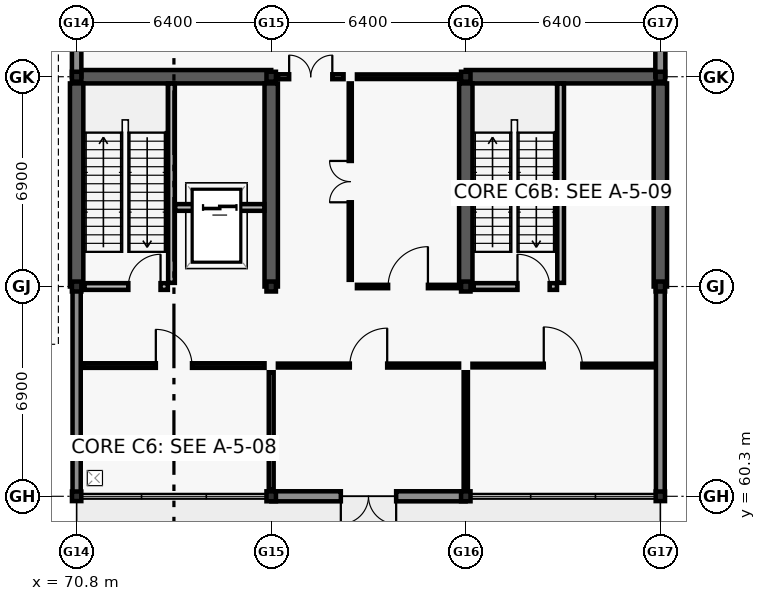
"""IFC4 building model, lengths in metres.
Left out: names, types, materials, properties, quantities, classifications, styles, units other than length and angle.
Written with IfcOpenShell. Run it as: python <this file> out.ifc"""

import sys

from ifc_helpers import new_model, si_unit, direction, frame, frame_2d, origin, origin_2d, place, context, subcontext, project, spatial, rectangle, i_section, extrude, element, fill, save


model = new_model("IFC4")
c1 = context("Model", 3, precision=1e-05, world=origin(), true_north=direction((0.0, 1.0)))
c2 = subcontext(c1, "Body", "Model", "MODEL_VIEW")
j1 = project(units=[si_unit("LENGTHUNIT", "METRE"), si_unit("PLANEANGLEUNIT", "RADIAN")], contexts=[c1])
p1 = place(None, origin())
s1 = spatial("IfcSite", under=j1, at=p1, CompositionType="ELEMENT")
p2 = place(p1, origin())
s2 = spatial("IfcBuilding", under=s1, at=p2, CompositionType="ELEMENT")
p3 = place(p2, origin())
s3 = spatial("IfcBuildingStorey", under=s2, at=p3, CompositionType="ELEMENT", Elevation=0.0)
p4 = place(p3, frame((70.8, 60.3, 0.0), z_axis=(0.0, 0.0, 1.0), x_axis=(1.0, 0.0, 0.0)))
e1 = element("IfcColumn", 1, at=p4, inside=s3, PredefinedType="COLUMN", context=c2, shape_type="SweptSolid", body=[
    extrude(i_section(OverallWidth=0.307, OverallDepth=0.315, WebThickness=0.012, FlangeThickness=0.019, FilletRadius=0.017, at=origin_2d()), origin(), (0.0, 0.0, 1.0), 5.4),
])
for number, where, z_axis, x_axis in (
    (2, (70.8, 67.2, 0.0), (0.0, 0.0, 1.0), (1.0, 0.0, 0.0)),
    (3, (70.8, 74.1, 0.0), (0.0, 0.0, 1.0), (1.0, 0.0, 0.0)),
    (4, (77.2, 60.3, 0.0), (0.0, 0.0, 1.0), (1.0, 0.0, 0.0)),
    (5, (77.2, 67.2, 0.0), (0.0, 0.0, 1.0), (1.0, 0.0, 0.0)),
    (6, (77.2, 74.1, 0.0), (0.0, 0.0, 1.0), (1.0, 0.0, 0.0)),
    (7, (83.6, 60.3, 0.0), (0.0, 0.0, 1.0), (1.0, 0.0, 0.0)),
    (8, (83.6, 67.2, 0.0), (0.0, 0.0, 1.0), (1.0, 0.0, 0.0)),
    (9, (83.6, 74.1, 0.0), (0.0, 0.0, 1.0), (1.0, 0.0, 0.0)),
):
    element("IfcColumn", number, at=place(p3, frame(where, z_axis=z_axis, x_axis=x_axis)), inside=s3, PredefinedType="COLUMN", context=c2, shape_type="SweptSolid", body=[
        extrude(i_section(OverallWidth=0.311, OverallDepth=0.327, WebThickness=0.016, FlangeThickness=0.025, FilletRadius=0.017, at=origin_2d()), origin(), (0.0, 0.0, 1.0), 5.4),
    ])
p5 = place(p3, frame((90.0, 60.3, 0.0), z_axis=(0.0, 0.0, 1.0), x_axis=(1.0, 0.0, 0.0)))
e10 = element("IfcColumn", 10, at=p5, inside=s3, PredefinedType="COLUMN", context=c2, shape_type="SweptSolid", body=[
    extrude(i_section(OverallWidth=0.307, OverallDepth=0.315, WebThickness=0.012, FlangeThickness=0.019, FilletRadius=0.017, at=origin_2d()), origin(), (0.0, 0.0, 1.0), 5.4),
])
for number, where, z_axis, x_axis in (
    (11, (90.0, 67.2, 0.0), (0.0, 0.0, 1.0), (1.0, 0.0, 0.0)),
    (12, (90.0, 74.1, 0.0), (0.0, 0.0, 1.0), (1.0, 0.0, 0.0)),
):
    element("IfcColumn", number, at=place(p3, frame(where, z_axis=z_axis, x_axis=x_axis)), inside=s3, PredefinedType="COLUMN", context=c2, shape_type="SweptSolid", body=[
        extrude(i_section(OverallWidth=0.311, OverallDepth=0.327, WebThickness=0.016, FlangeThickness=0.025, FilletRadius=0.017, at=origin_2d()), origin(), (0.0, 0.0, 1.0), 5.4),
    ])
p6 = place(p3, frame((70.8, 74.1, 0.0), z_axis=(0.0, 0.0, 1.0), x_axis=(1.0, 0.0, 0.0)))
e13 = element("IfcWall", 13, at=p6, inside=s3, PredefinedType="SHEAR", context=c2, shape_type="SweptSolid", body=[
    extrude(rectangle(XDim=6.4, YDim=0.44, at=frame_2d((3.2, 0.0))), origin(), (0.0, 0.0, 1.0), 5.16),
])
for number, where, z_axis, x_axis in (
    (14, (70.8, 67.2, 0.0), (0.0, 0.0, 1.0), (0.0, 1.0, 0.0)),
    (15, (77.2, 67.2, 0.0), (0.0, 0.0, 1.0), (0.0, 1.0, 0.0)),
):
    element("IfcWall", number, at=place(p3, frame(where, z_axis=z_axis, x_axis=x_axis)), inside=s3, PredefinedType="SHEAR", context=c2, shape_type="SweptSolid", body=[
        extrude(rectangle(XDim=6.68, YDim=0.44, at=frame_2d((3.34, 0.0))), origin(), (0.0, 0.0, 1.0), 5.16),
    ])
p7 = place(p3, frame((83.6, 74.1, 0.0), z_axis=(0.0, 0.0, 1.0), x_axis=(1.0, 0.0, 0.0)))
e16 = element("IfcWall", 16, at=p7, inside=s3, PredefinedType="SHEAR", context=c2, shape_type="SweptSolid", body=[
    extrude(rectangle(XDim=6.4, YDim=0.44, at=frame_2d((3.2, 0.0))), origin(), (0.0, 0.0, 1.0), 5.16),
])
for number, where, z_axis, x_axis in (
    (17, (83.6, 67.2, 0.0), (0.0, 0.0, 1.0), (0.0, 1.0, 0.0)),
    (18, (90.0, 67.2, 0.0), (0.0, 0.0, 1.0), (0.0, 1.0, 0.0)),
):
    element("IfcWall", number, at=place(p3, frame(where, z_axis=z_axis, x_axis=x_axis)), inside=s3, PredefinedType="SHEAR", context=c2, shape_type="SweptSolid", body=[
        extrude(rectangle(XDim=6.68, YDim=0.44, at=frame_2d((3.34, 0.0))), origin(), (0.0, 0.0, 1.0), 5.16),
    ])
p8 = place(p3, frame((83.595, 60.3, 0.0), z_axis=(0.0, 0.0, 1.0), x_axis=(-1.0, 0.0, 0.0)))
e19 = element("IfcWall", 19, at=p8, inside=s3, PredefinedType="SOLIDWALL", context=c2, shape_type="SweptSolid", body=[
    extrude(rectangle(XDim=6.39, YDim=0.33, at=frame_2d((3.195, 0.0))), origin(), (0.0, 0.0, 1.0), 4.52),
])
p9 = place(p8, frame((2.285, 0.0, 0.0)))
e20 = element("IfcOpeningElement", 20, at=p9, cuts=e19, PredefinedType="OPENING", context=c2, shape_type="SweptSolid", body=[
    extrude(rectangle(XDim=1.82, YDim=2.2, at=frame_2d((0.91, 1.1))), frame((0.0, 0.175, 0.0), z_axis=(0.0, -1.0, 0.0), x_axis=(1.0, 0.0, 0.0)), (0.0, 0.0, 1.0), 0.35),
])
p10 = place(p3, frame((70.8, 60.305, 0.0), z_axis=(0.0, 0.0, 1.0), x_axis=(0.0, 1.0, 0.0)))
e21 = element("IfcWall", 21, at=p10, inside=s3, PredefinedType="SOLIDWALL", context=c2, shape_type="SweptSolid", body=[
    extrude(rectangle(XDim=6.89, YDim=0.27, at=frame_2d((3.445, 0.0))), origin(), (0.0, 0.0, 1.0), 4.52),
])
p11 = place(p3, frame((90.0, 67.195, 0.0), z_axis=(0.0, 0.0, 1.0), x_axis=(0.0, -1.0, 0.0)))
e22 = element("IfcWall", 22, at=p11, inside=s3, PredefinedType="SOLIDWALL", context=c2, shape_type="SweptSolid", body=[
    extrude(rectangle(XDim=6.89, YDim=0.29, at=frame_2d((3.445, 0.0))), origin(), (0.0, 0.0, 1.0), 4.52),
])
p12 = place(p3, frame((70.8, 74.105, 0.0), z_axis=(0.0, 0.0, 1.0), x_axis=(0.0, 1.0, 0.0)))
e23 = element("IfcWall", 23, at=p12, inside=s3, PredefinedType="SOLIDWALL", context=c2, shape_type="SweptSolid", body=[
    extrude(rectangle(XDim=6.89, YDim=0.31, at=frame_2d((3.445, 0.0))), origin(), (0.0, 0.0, 1.0), 4.52),
])
p13 = place(p12, frame((2.62, 0.0, 0.8)))
e24 = element("IfcOpeningElement", 24, at=p13, cuts=e23, PredefinedType="OPENING", context=c2, shape_type="SweptSolid", body=[
    extrude(rectangle(XDim=1.65, YDim=2.05, at=frame_2d((0.825, 1.025))), frame((0.0, 0.165, 0.0), z_axis=(0.0, -1.0, 0.0), x_axis=(1.0, 0.0, 0.0)), (0.0, 0.0, 1.0), 0.33),
])
p14 = place(p3, frame((90.0, 80.995, 0.0), z_axis=(0.0, 0.0, 1.0), x_axis=(0.0, -1.0, 0.0)))
e25 = element("IfcWall", 25, at=p14, inside=s3, PredefinedType="SOLIDWALL", context=c2, shape_type="SweptSolid", body=[
    extrude(rectangle(XDim=6.89, YDim=0.33, at=frame_2d((3.445, 0.0))), origin(), (0.0, 0.0, 1.0), 4.52),
])
p15 = place(p14, frame((2.295, 0.0, 0.8)))
e26 = element("IfcOpeningElement", 26, at=p15, cuts=e25, PredefinedType="OPENING", context=c2, shape_type="SweptSolid", body=[
    extrude(rectangle(XDim=2.3, YDim=1.15, at=frame_2d((1.15, 0.575))), frame((0.0, 0.175, 0.0), z_axis=(0.0, -1.0, 0.0), x_axis=(1.0, 0.0, 0.0)), (0.0, 0.0, 1.0), 0.35),
])
p16 = place(p3, frame((73.92, 67.32, 0.0), z_axis=(0.0, 0.0, 1.0), x_axis=(0.0, 1.0, 0.0)))
e27 = element("IfcWall", 27, at=p16, inside=s3, PredefinedType="SOLIDWALL", context=c2, shape_type="SweptSolid", body=[
    extrude(rectangle(XDim=6.555, YDim=0.22, at=frame_2d((3.277, 0.0))), origin(), (0.0, 0.0, 1.0), 5.16),
])
p17 = place(p3, frame((71.06, 67.2, 0.0), z_axis=(0.0, 0.0, 1.0), x_axis=(1.0, 0.0, 0.0)))
e28 = element("IfcWall", 28, at=p17, inside=s3, PredefinedType="SOLIDWALL", context=c2, shape_type="SweptSolid", body=[
    extrude(rectangle(XDim=2.74, YDim=0.22, at=frame_2d((1.37, 0.0))), origin(), (0.0, 0.0, 1.0), 4.52),
])
p18 = place(p17, frame((1.44, 0.0, 0.0)))
e29 = element("IfcOpeningElement", 29, at=p18, cuts=e28, PredefinedType="OPENING", context=c2, shape_type="SweptSolid", body=[
    extrude(rectangle(XDim=1.06, YDim=2.1, at=frame_2d((0.53, 1.05))), frame((0.0, 0.12, 0.0), z_axis=(0.0, -1.0, 0.0), x_axis=(1.0, 0.0, 0.0)), (0.0, 0.0, 1.0), 0.24),
])
p19 = place(p3, frame((74.04, 69.8, 0.0), z_axis=(0.0, 0.0, 1.0), x_axis=(1.0, 0.0, 0.0)))
e30 = element("IfcWall", 30, at=p19, inside=s3, PredefinedType="SOLIDWALL", context=c2, shape_type="SweptSolid", body=[
    extrude(rectangle(XDim=2.935, YDim=0.22, at=frame_2d((1.468, 0.0))), origin(), (0.0, 0.0, 1.0), 5.16),
])
p20 = place(p19, frame((0.917, 0.0, 0.0)))
e31 = element("IfcOpeningElement", 31, at=p20, cuts=e30, PredefinedType="OPENING", context=c2, shape_type="SweptSolid", body=[
    extrude(rectangle(XDim=1.1, YDim=2.1, at=frame_2d((0.55, 1.05))), frame((0.0, 0.12, 0.0), z_axis=(0.0, -1.0, 0.0), x_axis=(1.0, 0.0, 0.0)), (0.0, 0.0, 1.0), 0.24),
])
p21 = place(p3, frame((86.72, 67.32, 0.0), z_axis=(0.0, 0.0, 1.0), x_axis=(0.0, 1.0, 0.0)))
e32 = element("IfcWall", 32, at=p21, inside=s3, PredefinedType="SOLIDWALL", context=c2, shape_type="SweptSolid", body=[
    extrude(rectangle(XDim=6.555, YDim=0.22, at=frame_2d((3.277, 0.0))), origin(), (0.0, 0.0, 1.0), 5.16),
])
p22 = place(p3, frame((83.86, 67.2, 0.0), z_axis=(0.0, 0.0, 1.0), x_axis=(1.0, 0.0, 0.0)))
e33 = element("IfcWall", 33, at=p22, inside=s3, PredefinedType="SOLIDWALL", context=c2, shape_type="SweptSolid", body=[
    extrude(rectangle(XDim=2.74, YDim=0.22, at=frame_2d((1.37, 0.0))), origin(), (0.0, 0.0, 1.0), 4.52),
])
p23 = place(p22, frame((1.44, 0.0, 0.0)))
e34 = element("IfcOpeningElement", 34, at=p23, cuts=e33, PredefinedType="OPENING", context=c2, shape_type="SweptSolid", body=[
    extrude(rectangle(XDim=1.06, YDim=2.1, at=frame_2d((0.53, 1.05))), frame((0.0, 0.12, 0.0), z_axis=(0.0, -1.0, 0.0), x_axis=(1.0, 0.0, 0.0)), (0.0, 0.0, 1.0), 0.24),
])
p24 = place(p3, frame((77.2, 60.52, 0.0), z_axis=(0.0, 0.0, 1.0), x_axis=(0.0, 1.0, 0.0)))
e35 = element("IfcWall", 35, at=p24, inside=s3, PredefinedType="PARTITIONING", context=c2, shape_type="SweptSolid", body=[
    extrude(rectangle(XDim=3.86, YDim=0.16, at=frame_2d((1.93, 0.0))), origin(), (0.0, 0.0, 1.0), 4.5),
])
p25 = place(p3, frame((71.02, 64.6, 0.0), z_axis=(0.0, 0.0, 1.0), x_axis=(1.0, 0.0, 0.0)))
e36 = element("IfcWall", 36, at=p25, inside=s3, PredefinedType="PARTITIONING", context=c2, shape_type="SweptSolid", body=[
    extrude(rectangle(XDim=5.96, YDim=0.15, at=frame_2d((2.98, 0.0))), origin(), (0.0, 0.0, 1.0), 4.5),
])
p26 = place(p25, frame((2.385, 0.0, 0.0)))
e37 = element("IfcOpeningElement", 37, at=p26, cuts=e36, PredefinedType="OPENING", context=c2, shape_type="SweptSolid", body=[
    extrude(rectangle(XDim=1.19, YDim=2.14, at=frame_2d((0.595, 1.07))), frame((0.0, 0.085, 0.0), z_axis=(0.0, -1.0, 0.0), x_axis=(1.0, 0.0, 0.0)), (0.0, 0.0, 1.0), 0.17),
])
p27 = place(p3, frame((83.6, 60.52, 0.0), z_axis=(0.0, 0.0, 1.0), x_axis=(0.0, 1.0, 0.0)))
e38 = element("IfcWall", 38, at=p27, inside=s3, PredefinedType="PARTITIONING", context=c2, shape_type="SweptSolid", body=[
    extrude(rectangle(XDim=3.86, YDim=0.14, at=frame_2d((1.93, 0.0))), origin(), (0.0, 0.0, 1.0), 4.5),
])
p28 = place(p3, frame((77.42, 64.6, 0.0), z_axis=(0.0, 0.0, 1.0), x_axis=(1.0, 0.0, 0.0)))
e39 = element("IfcWall", 39, at=p28, inside=s3, PredefinedType="PARTITIONING", context=c2, shape_type="SweptSolid", body=[
    extrude(rectangle(XDim=5.96, YDim=0.13, at=frame_2d((2.98, 0.0))), origin(), (0.0, 0.0, 1.0), 4.5),
])
p29 = place(p28, frame((2.365, 0.0, 0.0)))
e40 = element("IfcOpeningElement", 40, at=p29, cuts=e39, PredefinedType="OPENING", context=c2, shape_type="SweptSolid", body=[
    extrude(rectangle(XDim=1.23, YDim=2.08, at=frame_2d((0.615, 1.04))), frame((0.0, 0.075, 0.0), z_axis=(0.0, -1.0, 0.0), x_axis=(1.0, 0.0, 0.0)), (0.0, 0.0, 1.0), 0.15),
])
p30 = place(p3, frame((83.82, 64.6, 0.0), z_axis=(0.0, 0.0, 1.0), x_axis=(1.0, 0.0, 0.0)))
e41 = element("IfcWall", 41, at=p30, inside=s3, PredefinedType="PARTITIONING", context=c2, shape_type="SweptSolid", body=[
    extrude(rectangle(XDim=5.96, YDim=0.12, at=frame_2d((2.98, 0.0))), origin(), (0.0, 0.0, 1.0), 4.5),
])
p31 = place(p30, frame((2.345, 0.0, 0.0)))
e42 = element("IfcOpeningElement", 42, at=p31, cuts=e41, PredefinedType="OPENING", context=c2, shape_type="SweptSolid", body=[
    extrude(rectangle(XDim=1.27, YDim=2.1, at=frame_2d((0.635, 1.05))), frame((0.0, 0.07, 0.0), z_axis=(0.0, -1.0, 0.0), x_axis=(1.0, 0.0, 0.0)), (0.0, 0.0, 1.0), 0.14),
])
p32 = place(p3, frame((80.02, 67.2, 0.0), z_axis=(0.0, 0.0, 1.0), x_axis=(1.0, 0.0, 0.0)))
e43 = element("IfcWall", 43, at=p32, inside=s3, PredefinedType="PARTITIONING", context=c2, shape_type="SweptSolid", body=[
    extrude(rectangle(XDim=3.36, YDim=0.11, at=frame_2d((1.68, 0.0))), origin(), (0.0, 0.0, 1.0), 4.5),
])
p33 = place(p32, frame((1.025, 0.0, 0.0)))
e44 = element("IfcOpeningElement", 44, at=p33, cuts=e43, PredefinedType="OPENING", context=c2, shape_type="SweptSolid", body=[
    extrude(rectangle(XDim=1.31, YDim=2.14, at=frame_2d((0.655, 1.07))), frame((0.0, 0.065, 0.0), z_axis=(0.0, -1.0, 0.0), x_axis=(1.0, 0.0, 0.0)), (0.0, 0.0, 1.0), 0.13),
])
p34 = place(p3, frame((79.8, 67.42, 0.0), z_axis=(0.0, 0.0, 1.0), x_axis=(0.0, 1.0, 0.0)))
e45 = element("IfcWall", 45, at=p34, inside=s3, PredefinedType="PARTITIONING", context=c2, shape_type="SweptSolid", body=[
    extrude(rectangle(XDim=6.46, YDim=0.1, at=frame_2d((3.23, 0.0))), origin(), (0.0, 0.0, 1.0), 4.5),
])
p35 = place(p34, frame((2.55, 0.0, 0.0)))
e46 = element("IfcOpeningElement", 46, at=p35, cuts=e45, PredefinedType="OPENING", context=c2, shape_type="SweptSolid", body=[
    extrude(rectangle(XDim=1.36, YDim=2.15, at=frame_2d((0.68, 1.075))), frame((0.0, 0.06, 0.0), z_axis=(0.0, -1.0, 0.0), x_axis=(1.0, 0.0, 0.0)), (0.0, 0.0, 1.0), 0.12),
])
p36 = place(p3, frame((77.42, 74.1, 0.0), z_axis=(0.0, 0.0, 1.0), x_axis=(1.0, 0.0, 0.0)))
e47 = element("IfcWall", 47, at=p36, inside=s3, PredefinedType="PARTITIONING", context=c2, shape_type="SweptSolid", body=[
    extrude(rectangle(XDim=2.16, YDim=0.16, at=frame_2d((1.08, 0.0))), origin(), (0.0, 0.0, 1.0), 4.5),
])
p37 = place(p36, frame((0.37, 0.0, 0.0)))
e48 = element("IfcOpeningElement", 48, at=p37, cuts=e47, PredefinedType="OPENING", context=c2, shape_type="SweptSolid", body=[
    extrude(rectangle(XDim=1.42, YDim=2.15, at=frame_2d((0.71, 1.075))), frame((0.0, 0.09, 0.0), z_axis=(0.0, -1.0, 0.0), x_axis=(1.0, 0.0, 0.0)), (0.0, 0.0, 1.0), 0.18),
])
p38 = place(p3, frame((80.02, 74.1, 0.0), z_axis=(0.0, 0.0, 1.0), x_axis=(1.0, 0.0, 0.0)))
e49 = element("IfcWall", 49, at=p38, inside=s3, PredefinedType="PARTITIONING", context=c2, shape_type="SweptSolid", body=[
    extrude(rectangle(XDim=3.36, YDim=0.15, at=frame_2d((1.68, 0.0))), origin(), (0.0, 0.0, 1.0), 4.5),
])
p39 = place(p9, origin())
e50 = element("IfcDoor", 50, at=p39, inside=s3, OperationType="DOUBLE_DOOR_SINGLE_SWING", PredefinedType="DOOR", context=c2, shape_type="SweptSolid", body=[
    extrude(rectangle(XDim=1.82, YDim=2.2, at=frame_2d((0.91, 1.1))), frame((0.0, 0.025, 0.0), z_axis=(0.0, -1.0, 0.0), x_axis=(1.0, 0.0, 0.0)), (0.0, 0.0, 1.0), 0.05),
])
fill(e20, e50)
p40 = place(p18, origin())
e51 = element("IfcDoor", 51, at=p40, inside=s3, OperationType="SINGLE_SWING_RIGHT", PredefinedType="DOOR", context=c2, shape_type="SweptSolid", body=[
    extrude(rectangle(XDim=1.06, YDim=2.1, at=frame_2d((0.53, 1.05))), frame((0.0, 0.025, 0.0), z_axis=(0.0, -1.0, 0.0), x_axis=(1.0, 0.0, 0.0)), (0.0, 0.0, 1.0), 0.05),
])
fill(e29, e51)
p41 = place(p20, origin())
e52 = element("IfcDoor", 52, at=p41, inside=s3, OperationType="DOUBLE_DOOR_SLIDING", PredefinedType="DOOR", context=c2, shape_type="SweptSolid", body=[
    extrude(rectangle(XDim=1.1, YDim=2.1, at=frame_2d((0.55, 1.05))), frame((0.0, 0.025, 0.0), z_axis=(0.0, -1.0, 0.0), x_axis=(1.0, 0.0, 0.0)), (0.0, 0.0, 1.0), 0.05),
])
fill(e31, e52)
p42 = place(p23, origin())
e53 = element("IfcDoor", 53, at=p42, inside=s3, OperationType="SINGLE_SWING_LEFT", PredefinedType="DOOR", context=c2, shape_type="SweptSolid", body=[
    extrude(rectangle(XDim=1.06, YDim=2.1, at=frame_2d((0.53, 1.05))), frame((0.0, 0.025, 0.0), z_axis=(0.0, -1.0, 0.0), x_axis=(1.0, 0.0, 0.0)), (0.0, 0.0, 1.0), 0.05),
])
fill(e34, e53)
p43 = place(p26, origin())
e54 = element("IfcDoor", 54, at=p43, inside=s3, OperationType="SINGLE_SWING_LEFT", PredefinedType="DOOR", context=c2, shape_type="SweptSolid", body=[
    extrude(rectangle(XDim=1.19, YDim=2.14, at=frame_2d((0.595, 1.07))), frame((0.0, 0.025, 0.0), z_axis=(0.0, -1.0, 0.0), x_axis=(1.0, 0.0, 0.0)), (0.0, 0.0, 1.0), 0.05),
])
fill(e37, e54)
p44 = place(p29, origin())
e55 = element("IfcDoor", 55, at=p44, inside=s3, OperationType="SINGLE_SWING_RIGHT", PredefinedType="DOOR", context=c2, shape_type="SweptSolid", body=[
    extrude(rectangle(XDim=1.23, YDim=2.08, at=frame_2d((0.615, 1.04))), frame((0.0, 0.025, 0.0), z_axis=(0.0, -1.0, 0.0), x_axis=(1.0, 0.0, 0.0)), (0.0, 0.0, 1.0), 0.05),
])
fill(e40, e55)
p45 = place(p31, origin())
e56 = element("IfcDoor", 56, at=p45, inside=s3, OperationType="SINGLE_SWING_LEFT", PredefinedType="DOOR", context=c2, shape_type="SweptSolid", body=[
    extrude(rectangle(XDim=1.27, YDim=2.1, at=frame_2d((0.635, 1.05))), frame((0.0, 0.025, 0.0), z_axis=(0.0, -1.0, 0.0), x_axis=(1.0, 0.0, 0.0)), (0.0, 0.0, 1.0), 0.05),
])
fill(e42, e56)
p46 = place(p33, origin())
e57 = element("IfcDoor", 57, at=p46, inside=s3, OperationType="SINGLE_SWING_RIGHT", PredefinedType="DOOR", context=c2, shape_type="SweptSolid", body=[
    extrude(rectangle(XDim=1.31, YDim=2.14, at=frame_2d((0.655, 1.07))), frame((0.0, 0.025, 0.0), z_axis=(0.0, -1.0, 0.0), x_axis=(1.0, 0.0, 0.0)), (0.0, 0.0, 1.0), 0.05),
])
fill(e44, e57)
p47 = place(p35, origin())
e58 = element("IfcDoor", 58, at=p47, inside=s3, OperationType="DOUBLE_DOOR_SINGLE_SWING", PredefinedType="DOOR", context=c2, shape_type="SweptSolid", body=[
    extrude(rectangle(XDim=1.36, YDim=2.15, at=frame_2d((0.68, 1.075))), frame((0.0, 0.025, 0.0), z_axis=(0.0, -1.0, 0.0), x_axis=(1.0, 0.0, 0.0)), (0.0, 0.0, 1.0), 0.05),
])
fill(e46, e58)
p48 = place(p37, origin())
e59 = element("IfcDoor", 59, at=p48, inside=s3, OperationType="DOUBLE_DOOR_SINGLE_SWING", PredefinedType="DOOR", context=c2, shape_type="SweptSolid", body=[
    extrude(rectangle(XDim=1.42, YDim=2.15, at=frame_2d((0.71, 1.075))), frame((0.0, 0.025, 0.0), z_axis=(0.0, -1.0, 0.0), x_axis=(1.0, 0.0, 0.0)), (0.0, 0.0, 1.0), 0.05),
])
fill(e48, e59)
save(model, sys.argv[1])
